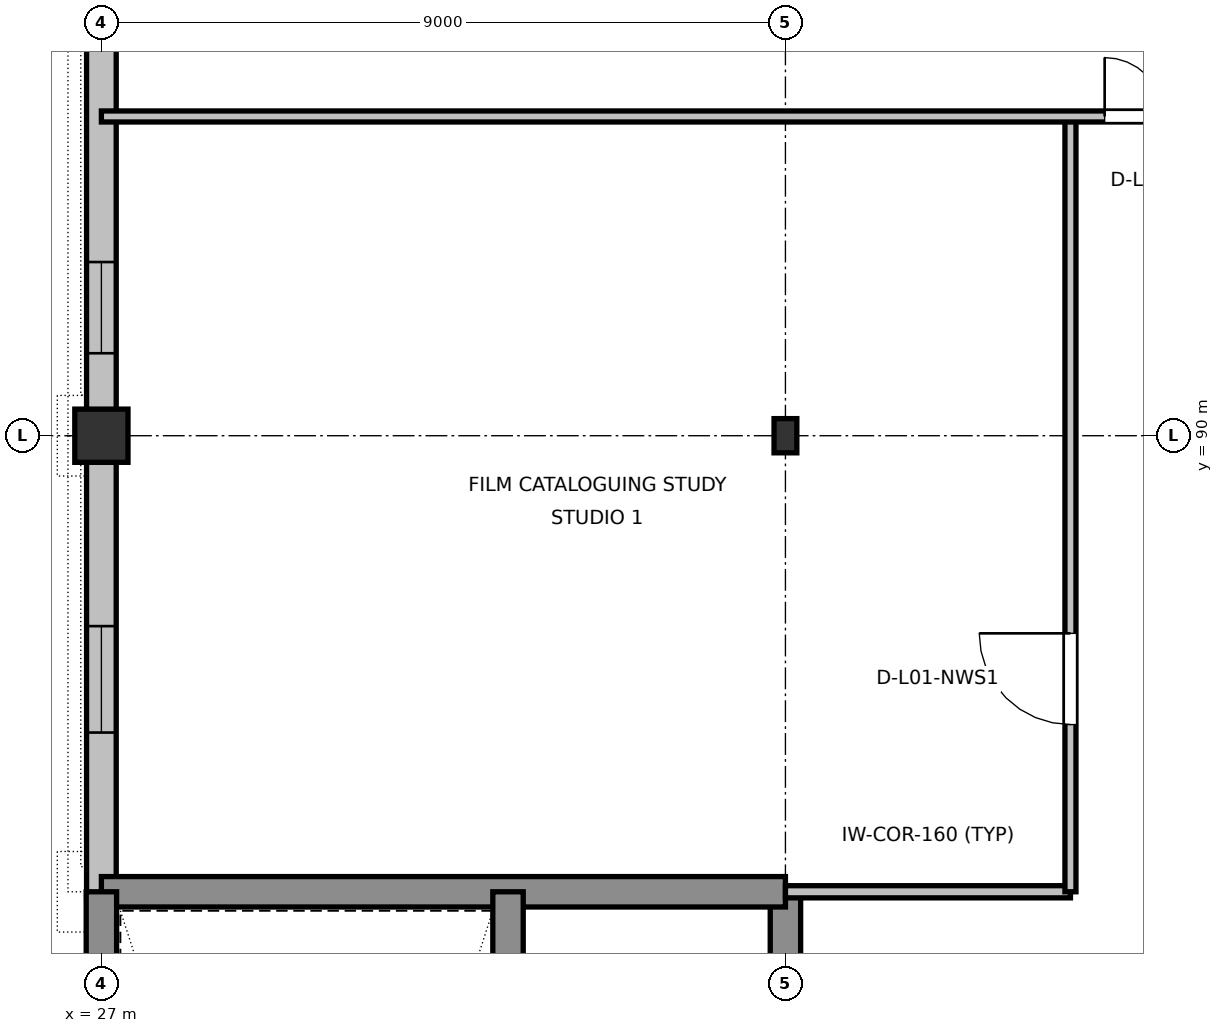
"""IFC4 building model, lengths in metres.
Left out: names, types, materials, properties, quantities, classifications, styles, units other than length and angle.
Written with IfcOpenShell. Run it as: python <this file> out.ifc"""

import sys

from ifc_helpers import new_model, si_unit, direction, frame, frame_2d, origin, origin_2d, place, context, subcontext, project, spatial, rectangle, i_section, extrude, element, fill, save


model = new_model("IFC4")
c1 = context("Model", 3, precision=1e-05, world=origin(), true_north=direction((0.0, 1.0)))
c2 = subcontext(c1, "Body", "Model", "MODEL_VIEW")
j1 = project(units=[si_unit("LENGTHUNIT", "METRE"), si_unit("PLANEANGLEUNIT", "RADIAN")], contexts=[c1])
p1 = place(None, origin())
s1 = spatial("IfcSite", under=j1, at=p1, CompositionType="ELEMENT")
p2 = place(p1, origin())
s2 = spatial("IfcBuilding", under=s1, at=p2, CompositionType="ELEMENT")
p3 = place(p2, frame((0.0, 0.0, 5.4)))
s3 = spatial("IfcBuildingStorey", under=s2, at=p3, CompositionType="ELEMENT", Elevation=5.4)
p4 = place(p3, frame((27.0, 90.0, 0.0), z_axis=(0.0, 0.0, 1.0), x_axis=(1.0, 0.0, 0.0)))
e1 = element("IfcColumn", 1, at=p4, inside=s3, PredefinedType="COLUMN", context=c2, shape_type="SweptSolid", body=[
    extrude(rectangle(XDim=0.7, YDim=0.7, at=origin_2d()), origin(), (0.0, 0.0, 1.0), 4.8),
])
p5 = place(p3, frame((36.0, 90.0, 0.0), z_axis=(0.0, 0.0, 1.0), x_axis=(1.0, 0.0, 0.0)))
e2 = element("IfcColumn", 2, at=p5, inside=s3, PredefinedType="COLUMN", context=c2, shape_type="SweptSolid", body=[
    extrude(i_section(OverallWidth=0.3, OverallDepth=0.45, WebThickness=0.014, FlangeThickness=0.026, at=origin_2d()), origin(), (0.0, 0.0, 1.0), 4.8),
])
p6 = place(p3, frame((27.0, 89.665, 0.0), z_axis=(0.0, 0.0, 1.0), x_axis=(0.0, -1.0, 0.0)))
e3 = element("IfcWall", 3, at=p6, inside=s3, PredefinedType="STANDARD", context=c2, shape_type="SweptSolid", body=[
    extrude(rectangle(XDim=5.74, YDim=0.39, at=frame_2d((2.87, 0.0))), origin(), (0.0, 0.0, 1.0), 4.195),
])
p7 = place(p6, frame((2.17, 0.0, 0.9)))
e4 = element("IfcOpeningElement", 4, at=p7, cuts=e3, PredefinedType="OPENING", context=c2, shape_type="SweptSolid", body=[
    extrude(rectangle(XDim=1.4, YDim=1.45, at=frame_2d((0.7, 0.725))), frame((0.0, 0.205, 0.0), z_axis=(0.0, -1.0, 0.0), x_axis=(1.0, 0.0, 0.0)), (0.0, 0.0, 1.0), 0.41),
])
p8 = place(p3, frame((27.0, 98.665, 0.0), z_axis=(0.0, 0.0, 1.0), x_axis=(0.0, -1.0, 0.0)))
e5 = element("IfcWall", 5, at=p8, inside=s3, PredefinedType="STANDARD", context=c2, shape_type="SweptSolid", body=[
    extrude(rectangle(XDim=8.33, YDim=0.39, at=frame_2d((4.165, 0.0))), origin(), (0.0, 0.0, 1.0), 4.195),
])
p9 = place(p8, frame((6.38, 0.0, 0.9)))
e6 = element("IfcOpeningElement", 6, at=p9, cuts=e5, PredefinedType="OPENING", context=c2, shape_type="SweptSolid", body=[
    extrude(rectangle(XDim=1.2, YDim=1.4, at=frame_2d((0.6, 0.7))), frame((0.0, 0.205, 0.0), z_axis=(0.0, -1.0, 0.0), x_axis=(1.0, 0.0, 0.0)), (0.0, 0.0, 1.0), 0.41),
])
p10 = place(p3, frame((36.0, 66.0, 0.0), z_axis=(0.0, 0.0, 1.0), x_axis=(0.0, 1.0, 0.0)))
e7 = element("IfcWall", 7, at=p10, inside=s3, PredefinedType="SHEAR", context=c2, shape_type="SweptSolid", body=[
    extrude(rectangle(XDim=18.0, YDim=0.4, at=frame_2d((9.0, 0.0))), origin(), (0.0, 0.0, 1.0), 4.56),
])
p11 = place(p10, frame((0.8, 0.0, 0.0)))
e8 = element("IfcOpeningElement", 8, at=p11, cuts=e7, PredefinedType="OPENING", context=c2, shape_type="SweptSolid", body=[
    extrude(rectangle(XDim=1.1, YDim=2.16, at=frame_2d((0.55, 1.08))), frame((0.0, 0.21, 0.0), z_axis=(0.0, -1.0, 0.0), x_axis=(1.0, 0.0, 0.0)), (0.0, 0.0, 1.0), 0.42),
])
p12 = place(p10, frame((3.2, 0.0, 0.0)))
e9 = element("IfcOpeningElement", 9, at=p12, cuts=e7, PredefinedType="OPENING", context=c2, shape_type="SweptSolid", body=[
    extrude(rectangle(XDim=1.2, YDim=2.2, at=frame_2d((0.6, 1.1))), frame((0.0, 0.21, 0.0), z_axis=(0.0, -1.0, 0.0), x_axis=(1.0, 0.0, 0.0)), (0.0, 0.0, 1.0), 0.42),
])
p13 = place(p10, frame((6.8, 0.0, 0.0)))
e10 = element("IfcOpeningElement", 10, at=p13, cuts=e7, PredefinedType="OPENING", context=c2, shape_type="SweptSolid", body=[
    extrude(rectangle(XDim=0.85, YDim=2.1, at=frame_2d((0.425, 1.05))), frame((0.0, 0.21, 0.0), z_axis=(0.0, -1.0, 0.0), x_axis=(1.0, 0.0, 0.0)), (0.0, 0.0, 1.0), 0.42),
])
p14 = place(p3, frame((36.0, 84.0, 0.0), z_axis=(0.0, 0.0, 1.0), x_axis=(-1.0, 0.0, 0.0)))
e11 = element("IfcWall", 11, at=p14, inside=s3, PredefinedType="SHEAR", context=c2, shape_type="SweptSolid", body=[
    extrude(rectangle(XDim=9.0, YDim=0.4, at=frame_2d((4.5, 0.0))), origin(), (0.0, 0.0, 1.0), 4.56),
])
p15 = place(p3, frame((27.0, 84.0, 0.0), z_axis=(0.0, 0.0, 1.0), x_axis=(0.0, -1.0, 0.0)))
e12 = element("IfcWall", 12, at=p15, inside=s3, PredefinedType="SHEAR", context=c2, shape_type="SweptSolid", body=[
    extrude(rectangle(XDim=18.0, YDim=0.4, at=frame_2d((9.0, 0.0))), origin(), (0.0, 0.0, 1.0), 4.56),
])
p16 = place(p3, frame((32.35, 66.0, 0.0), z_axis=(0.0, 0.0, 1.0), x_axis=(0.0, 1.0, 0.0)))
e13 = element("IfcWall", 13, at=p16, inside=s3, PredefinedType="SHEAR", context=c2, shape_type="SweptSolid", body=[
    extrude(rectangle(XDim=18.0, YDim=0.4, at=frame_2d((9.0, 0.0))), origin(), (0.0, 0.0, 1.0), 4.56),
])
p17 = place(p16, frame((0.7, 0.0, 0.0)))
e14 = element("IfcOpeningElement", 14, at=p17, cuts=e13, PredefinedType="OPENING", context=c2, shape_type="SweptSolid", body=[
    extrude(rectangle(XDim=1.1, YDim=2.16, at=frame_2d((0.55, 1.08))), frame((0.0, 0.21, 0.0), z_axis=(0.0, -1.0, 0.0), x_axis=(1.0, 0.0, 0.0)), (0.0, 0.0, 1.0), 0.42),
])
p18 = place(p3, frame((36.0, 84.0, 0.0), z_axis=(0.0, 0.0, 1.0), x_axis=(1.0, 0.0, 0.0)))
e15 = element("IfcWall", 15, at=p18, inside=s3, PredefinedType="PARTITIONING", context=c2, shape_type="SweptSolid", body=[
    extrude(rectangle(XDim=3.75, YDim=0.16, at=frame_2d((1.875, 0.0))), origin(), (0.0, 0.0, 1.0), 4.185),
])
p19 = place(p3, frame((39.75, 84.0, 0.0), z_axis=(0.0, 0.0, 1.0), x_axis=(0.0, 1.0, 0.0)))
e16 = element("IfcWall", 16, at=p19, inside=s3, PredefinedType="PARTITIONING", context=c2, shape_type="SweptSolid", body=[
    extrude(rectangle(XDim=10.2, YDim=0.145, at=frame_2d((5.1, 0.0))), origin(), (0.0, 0.0, 1.0), 4.56),
])
p20 = place(p19, frame((2.2, 0.0, 0.0)))
e17 = element("IfcOpeningElement", 17, at=p20, cuts=e16, PredefinedType="OPENING", context=c2, shape_type="SweptSolid", body=[
    extrude(rectangle(XDim=1.2, YDim=2.18, at=frame_2d((0.6, 1.09))), frame((0.0, 0.083, 0.0), z_axis=(0.0, -1.0, 0.0), x_axis=(1.0, 0.0, 0.0)), (0.0, 0.0, 1.0), 0.165),
])
p21 = place(p3, frame((27.0, 94.2, 0.0), z_axis=(0.0, 0.0, 1.0), x_axis=(1.0, 0.0, 0.0)))
e18 = element("IfcWall", 18, at=p21, inside=s3, PredefinedType="PARTITIONING", context=c2, shape_type="SweptSolid", body=[
    extrude(rectangle(XDim=54.0, YDim=0.145, at=frame_2d((27.0, 0.0))), origin(), (0.0, 0.0, 1.0), 4.56),
])
p22 = place(p21, frame((13.2, 0.0, 0.0)))
e19 = element("IfcOpeningElement", 19, at=p22, cuts=e18, PredefinedType="OPENING", context=c2, shape_type="SweptSolid", body=[
    extrude(rectangle(XDim=1.55, YDim=2.24, at=frame_2d((0.775, 1.12))), frame((0.0, 0.083, 0.0), z_axis=(0.0, -1.0, 0.0), x_axis=(1.0, 0.0, 0.0)), (0.0, 0.0, 1.0), 0.165),
])
p23 = place(p21, frame((28.8, 0.0, 0.0)))
e20 = element("IfcOpeningElement", 20, at=p23, cuts=e18, PredefinedType="OPENING", context=c2, shape_type="SweptSolid", body=[
    extrude(rectangle(XDim=1.55, YDim=2.24, at=frame_2d((0.775, 1.12))), frame((0.0, 0.083, 0.0), z_axis=(0.0, -1.0, 0.0), x_axis=(1.0, 0.0, 0.0)), (0.0, 0.0, 1.0), 0.165),
])
p24 = place(p7, origin())
e21 = element("IfcWindow", 21, at=p24, inside=s3, PartitioningType="SINGLE_PANEL", PredefinedType="WINDOW", context=c2, shape_type="SweptSolid", body=[
    extrude(rectangle(XDim=1.4, YDim=1.45, at=frame_2d((0.7, 0.725))), frame((0.0, 0.03, 0.0), z_axis=(0.0, -1.0, 0.0), x_axis=(1.0, 0.0, 0.0)), (0.0, 0.0, 1.0), 0.06),
])
fill(e4, e21)
p25 = place(p9, origin())
e22 = element("IfcWindow", 22, at=p25, inside=s3, PartitioningType="SINGLE_PANEL", PredefinedType="WINDOW", context=c2, shape_type="SweptSolid", body=[
    extrude(rectangle(XDim=1.2, YDim=1.4, at=frame_2d((0.6, 0.7))), frame((0.0, 0.03, 0.0), z_axis=(0.0, -1.0, 0.0), x_axis=(1.0, 0.0, 0.0)), (0.0, 0.0, 1.0), 0.06),
])
fill(e6, e22)
p26 = place(p20, origin())
e23 = element("IfcDoor", 23, at=p26, inside=s3, OperationType="SINGLE_SWING_RIGHT", PredefinedType="DOOR", context=c2, shape_type="SweptSolid", body=[
    extrude(rectangle(XDim=1.2, YDim=2.18, at=frame_2d((0.6, 1.09))), frame((0.0, 0.025, 0.0), z_axis=(0.0, -1.0, 0.0), x_axis=(1.0, 0.0, 0.0)), (0.0, 0.0, 1.0), 0.05),
])
fill(e17, e23)
p27 = place(p22, origin())
e24 = element("IfcDoor", 24, at=p27, inside=s3, OperationType="DOUBLE_DOOR_SINGLE_SWING", PredefinedType="DOOR", context=c2, shape_type="SweptSolid", body=[
    extrude(rectangle(XDim=1.55, YDim=2.24, at=frame_2d((0.775, 1.12))), frame((0.0, 0.025, 0.0), z_axis=(0.0, -1.0, 0.0), x_axis=(1.0, 0.0, 0.0)), (0.0, 0.0, 1.0), 0.05),
])
fill(e19, e24)
save(model, sys.argv[1])
